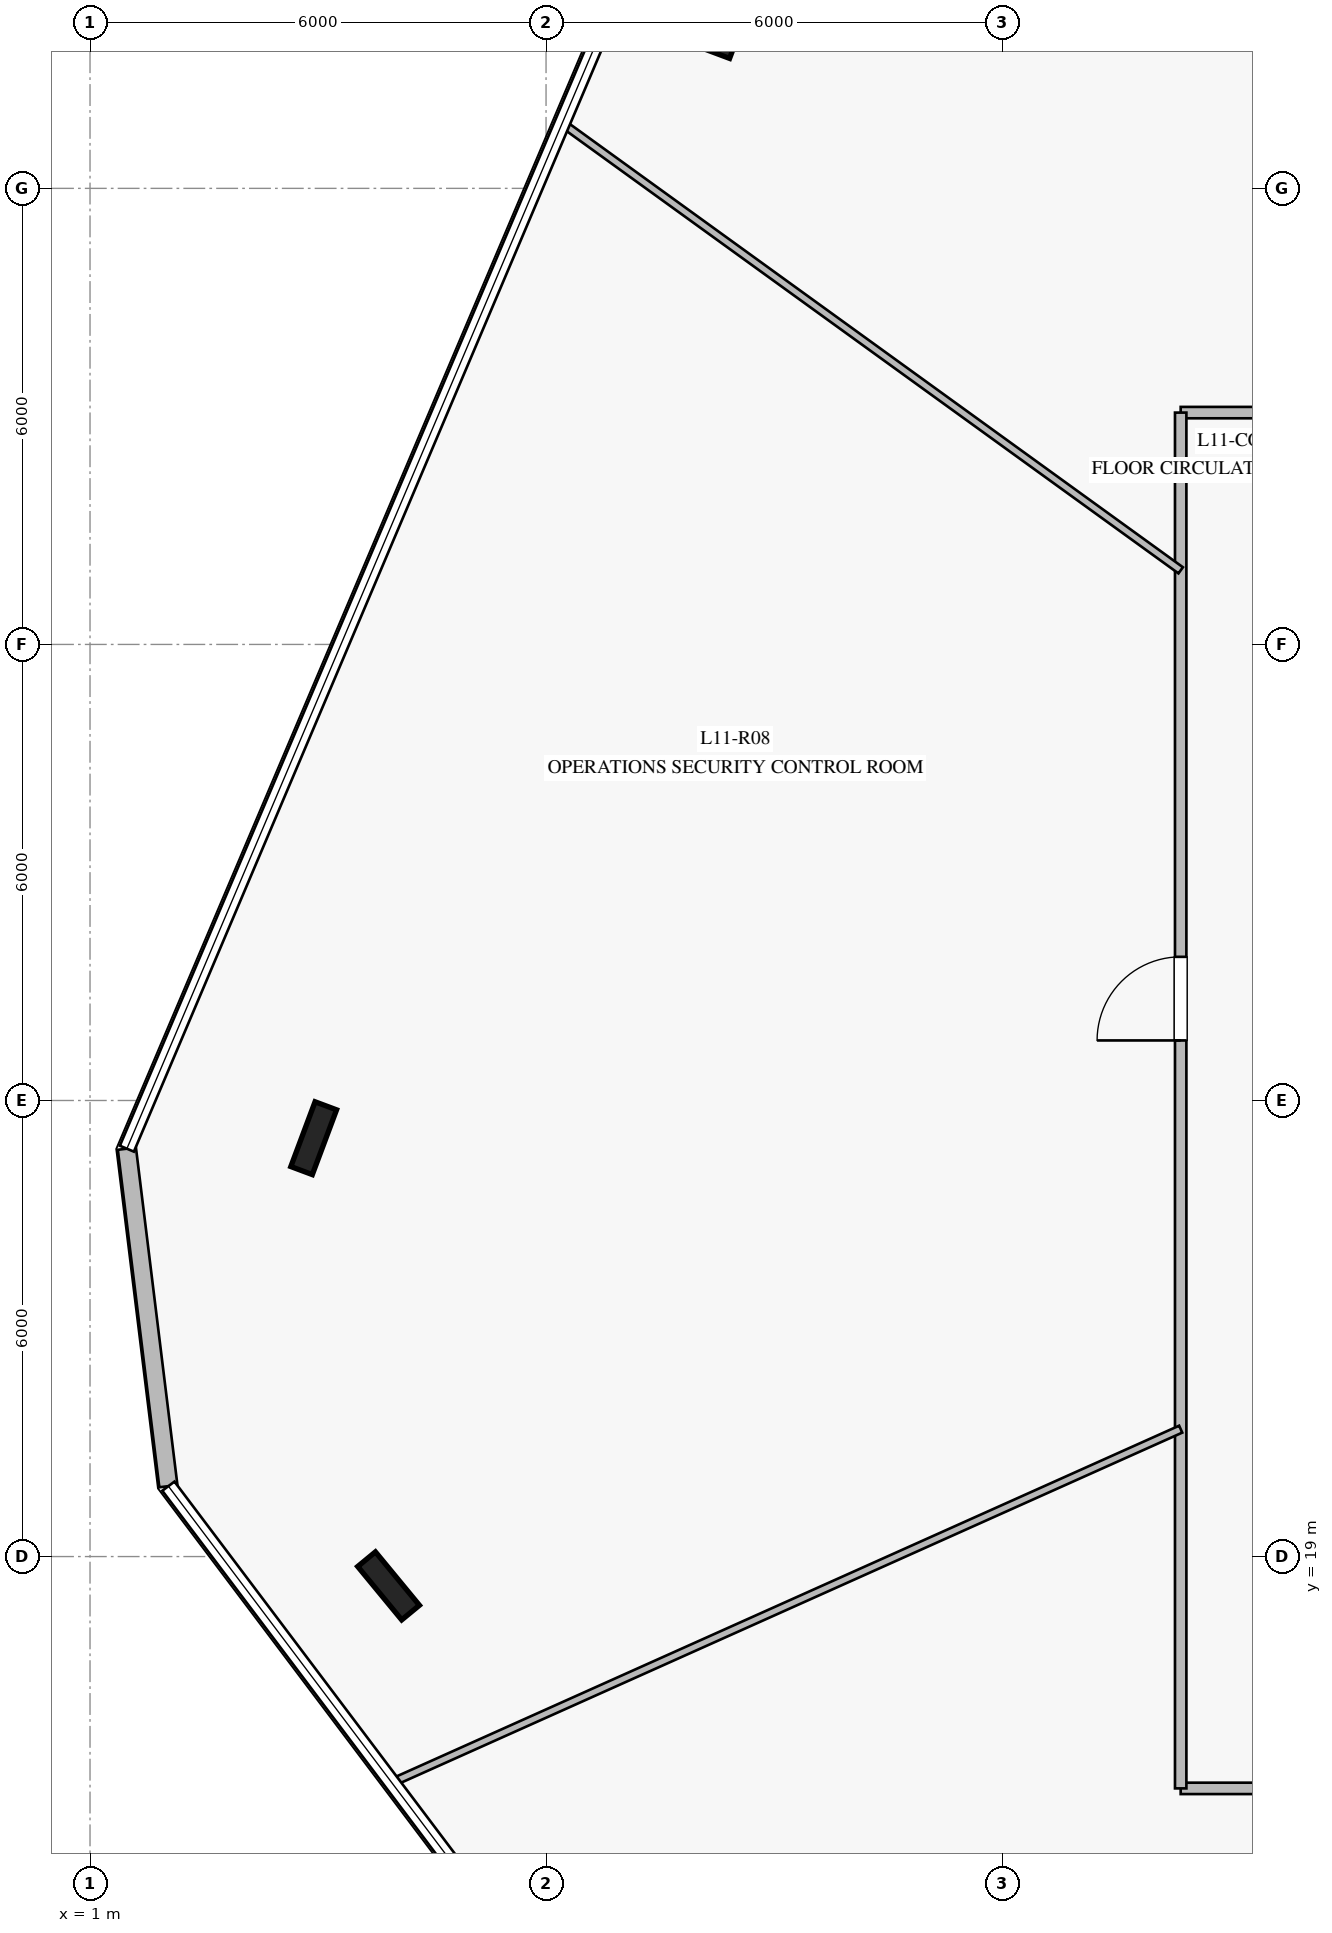
"""IFC4 building model, lengths in metres.
Left out: names, types, materials, properties, quantities, classifications, styles, units other than length and angle.
Written with IfcOpenShell. Run it as: python <this file> out.ifc"""

import sys

from ifc_helpers import new_model, si_unit, direction, frame, frame_2d, origin, origin_2d, place, context, subcontext, project, spatial, rectangle, i_section, extrude, element, fill, save


model = new_model("IFC4")
c1 = context("Model", 3, precision=1e-05, world=origin(), true_north=direction((0.0, 1.0)))
c2 = subcontext(c1, "Body", "Model", "MODEL_VIEW")
j1 = project(units=[si_unit("LENGTHUNIT", "METRE"), si_unit("PLANEANGLEUNIT", "RADIAN")], contexts=[c1])
p1 = place(None, origin())
s1 = spatial("IfcSite", under=j1, at=p1, CompositionType="ELEMENT")
p2 = place(p1, origin())
s2 = spatial("IfcBuilding", under=s1, at=p2, CompositionType="ELEMENT")
p3 = place(p2, frame((0.0, 0.0, 48.0)))
s3 = spatial("IfcBuildingStorey", under=s2, at=p3, CompositionType="ELEMENT", Elevation=48.0)
for number, where, z_axis, x_axis in (
    (1, (3.943, 24.504, 0.0), (0.0, 0.0, 1.0), (0.35, 0.937, 0.0)),
    (2, (4.928, 18.614, 0.0), (0.0, 0.0, 1.0), (-0.636, 0.772, 0.0)),
):
    element("IfcColumn", number, at=place(p3, frame(where, z_axis=z_axis, x_axis=x_axis)), inside=s3, PredefinedType="COLUMN", context=c2, shape_type="SweptSolid", body=[
        extrude(i_section(OverallWidth=0.302, OverallDepth=0.91, WebThickness=0.021, FlangeThickness=0.04, at=origin_2d()), origin(), (0.0, 0.0, 1.0), 4.0),
    ])
p4 = place(p3, frame((1.485, 24.366, 0.0), z_axis=(0.0, 0.0, 1.0), x_axis=(0.122032788479, -0.992526069449, 0.0)))
e3 = element("IfcWall", 3, at=p4, inside=s3, PredefinedType="STANDARD", context=c2, shape_type="SweptSolid", body=[
    extrude(rectangle(XDim=4.473, YDim=0.24, at=frame_2d((2.237, 0.0))), origin(), (0.0, 0.0, 1.0), 3.76),
])
p5 = place(p3, frame((15.35, 34.05, 0.0), z_axis=(0.0, 0.0, 1.0), x_axis=(1.0, 0.0, 0.0)))
e4 = element("IfcWall", 4, at=p5, inside=s3, PredefinedType="PARTITIONING", context=c2, shape_type="SweptSolid", body=[
    extrude(rectangle(XDim=19.3, YDim=0.15, at=frame_2d((9.65, 0.0))), origin(), (0.0, 0.0, 1.0), 3.21),
])
p6 = place(p5, frame((13.789, 0.0, 0.0)))
e5 = element("IfcOpeningElement", 5, at=p6, cuts=e4, PredefinedType="OPENING", context=c2, shape_type="SweptSolid", body=[
    extrude(rectangle(XDim=1.1, YDim=2.2, at=frame_2d((0.55, 1.1))), frame((0.0, 0.085, 0.0), z_axis=(0.0, -1.0, 0.0), x_axis=(1.0, 0.0, 0.0)), (0.0, 0.0, 1.0), 0.17),
])
p7 = place(p5, frame((4.592, 0.0, 0.0)))
e6 = element("IfcOpeningElement", 6, at=p7, cuts=e4, PredefinedType="OPENING", context=c2, shape_type="SweptSolid", body=[
    extrude(rectangle(XDim=1.1, YDim=2.2, at=frame_2d((0.55, 1.1))), frame((0.0, 0.085, 0.0), z_axis=(0.0, -1.0, 0.0), x_axis=(1.0, 0.0, 0.0)), (0.0, 0.0, 1.0), 0.17),
])
p8 = place(p3, frame((34.65, 15.95, 0.0), z_axis=(0.0, 0.0, 1.0), x_axis=(-1.0, 0.0, 0.0)))
e7 = element("IfcWall", 7, at=p8, inside=s3, PredefinedType="PARTITIONING", context=c2, shape_type="SweptSolid", body=[
    extrude(rectangle(XDim=19.3, YDim=0.15, at=frame_2d((9.65, 0.0))), origin(), (0.0, 0.0, 1.0), 3.21),
])
p9 = place(p8, frame((15.184, 0.0, 0.0)))
e8 = element("IfcOpeningElement", 8, at=p9, cuts=e7, PredefinedType="OPENING", context=c2, shape_type="SweptSolid", body=[
    extrude(rectangle(XDim=1.1, YDim=2.2, at=frame_2d((0.55, 1.1))), frame((0.0, 0.085, 0.0), z_axis=(0.0, -1.0, 0.0), x_axis=(1.0, 0.0, 0.0)), (0.0, 0.0, 1.0), 0.17),
])
p10 = place(p8, frame((6.268, 0.0, 0.0)))
e9 = element("IfcOpeningElement", 9, at=p10, cuts=e7, PredefinedType="OPENING", context=c2, shape_type="SweptSolid", body=[
    extrude(rectangle(XDim=1.1, YDim=2.2, at=frame_2d((0.55, 1.1))), frame((0.0, 0.085, 0.0), z_axis=(0.0, -1.0, 0.0), x_axis=(1.0, 0.0, 0.0)), (0.0, 0.0, 1.0), 0.17),
])
p11 = place(p3, frame((15.35, 15.95, 0.0), z_axis=(0.0, 0.0, 1.0), x_axis=(0.0, 1.0, 0.0)))
e10 = element("IfcWall", 10, at=p11, inside=s3, PredefinedType="PARTITIONING", context=c2, shape_type="SweptSolid", body=[
    extrude(rectangle(XDim=18.1, YDim=0.15, at=frame_2d((9.05, 0.0))), origin(), (0.0, 0.0, 1.0), 3.21),
])
p12 = place(p11, frame((9.84, 0.0, 0.0)))
e11 = element("IfcOpeningElement", 11, at=p12, cuts=e10, PredefinedType="OPENING", context=c2, shape_type="SweptSolid", body=[
    extrude(rectangle(XDim=1.1, YDim=2.2, at=frame_2d((0.55, 1.1))), frame((0.0, 0.085, 0.0), z_axis=(0.0, -1.0, 0.0), x_axis=(1.0, 0.0, 0.0)), (0.0, 0.0, 1.0), 0.17),
])
p13 = place(p3, frame((15.35, 31.975, 0.0), z_axis=(0.0, 0.0, 1.0), x_axis=(-0.810433800227, 0.585830227497, 0.0)))
e12 = element("IfcWall", 12, at=p13, inside=s3, PredefinedType="MOVABLE", context=c2, shape_type="SweptSolid", body=[
    extrude(rectangle(XDim=10.023, YDim=0.1, at=frame_2d((5.012, 0.0))), origin(), (0.0, 0.0, 1.0), 3.06),
])
p14 = place(p3, frame((15.35, 20.676, 0.0), z_axis=(0.0, 0.0, 1.0), x_axis=(-0.912557190222, -0.408949110005, 0.0)))
e13 = element("IfcWall", 13, at=p14, inside=s3, PredefinedType="MOVABLE", context=c2, shape_type="SweptSolid", body=[
    extrude(rectangle(XDim=11.356, YDim=0.1, at=frame_2d((5.678, 0.0))), origin(), (0.0, 0.0, 1.0), 3.06),
])
p15 = place(p12, origin())
e14 = element("IfcDoor", 14, at=p15, inside=s3, OperationType="SINGLE_SWING_LEFT", PredefinedType="DOOR", context=c2, shape_type="SweptSolid", body=[
    extrude(rectangle(XDim=1.1, YDim=2.2, at=frame_2d((0.55, 1.1))), frame((0.0, 0.025, 0.0), z_axis=(0.0, -1.0, 0.0), x_axis=(1.0, 0.0, 0.0)), (0.0, 0.0, 1.0), 0.05),
])
fill(e11, e14)
save(model, sys.argv[1])
